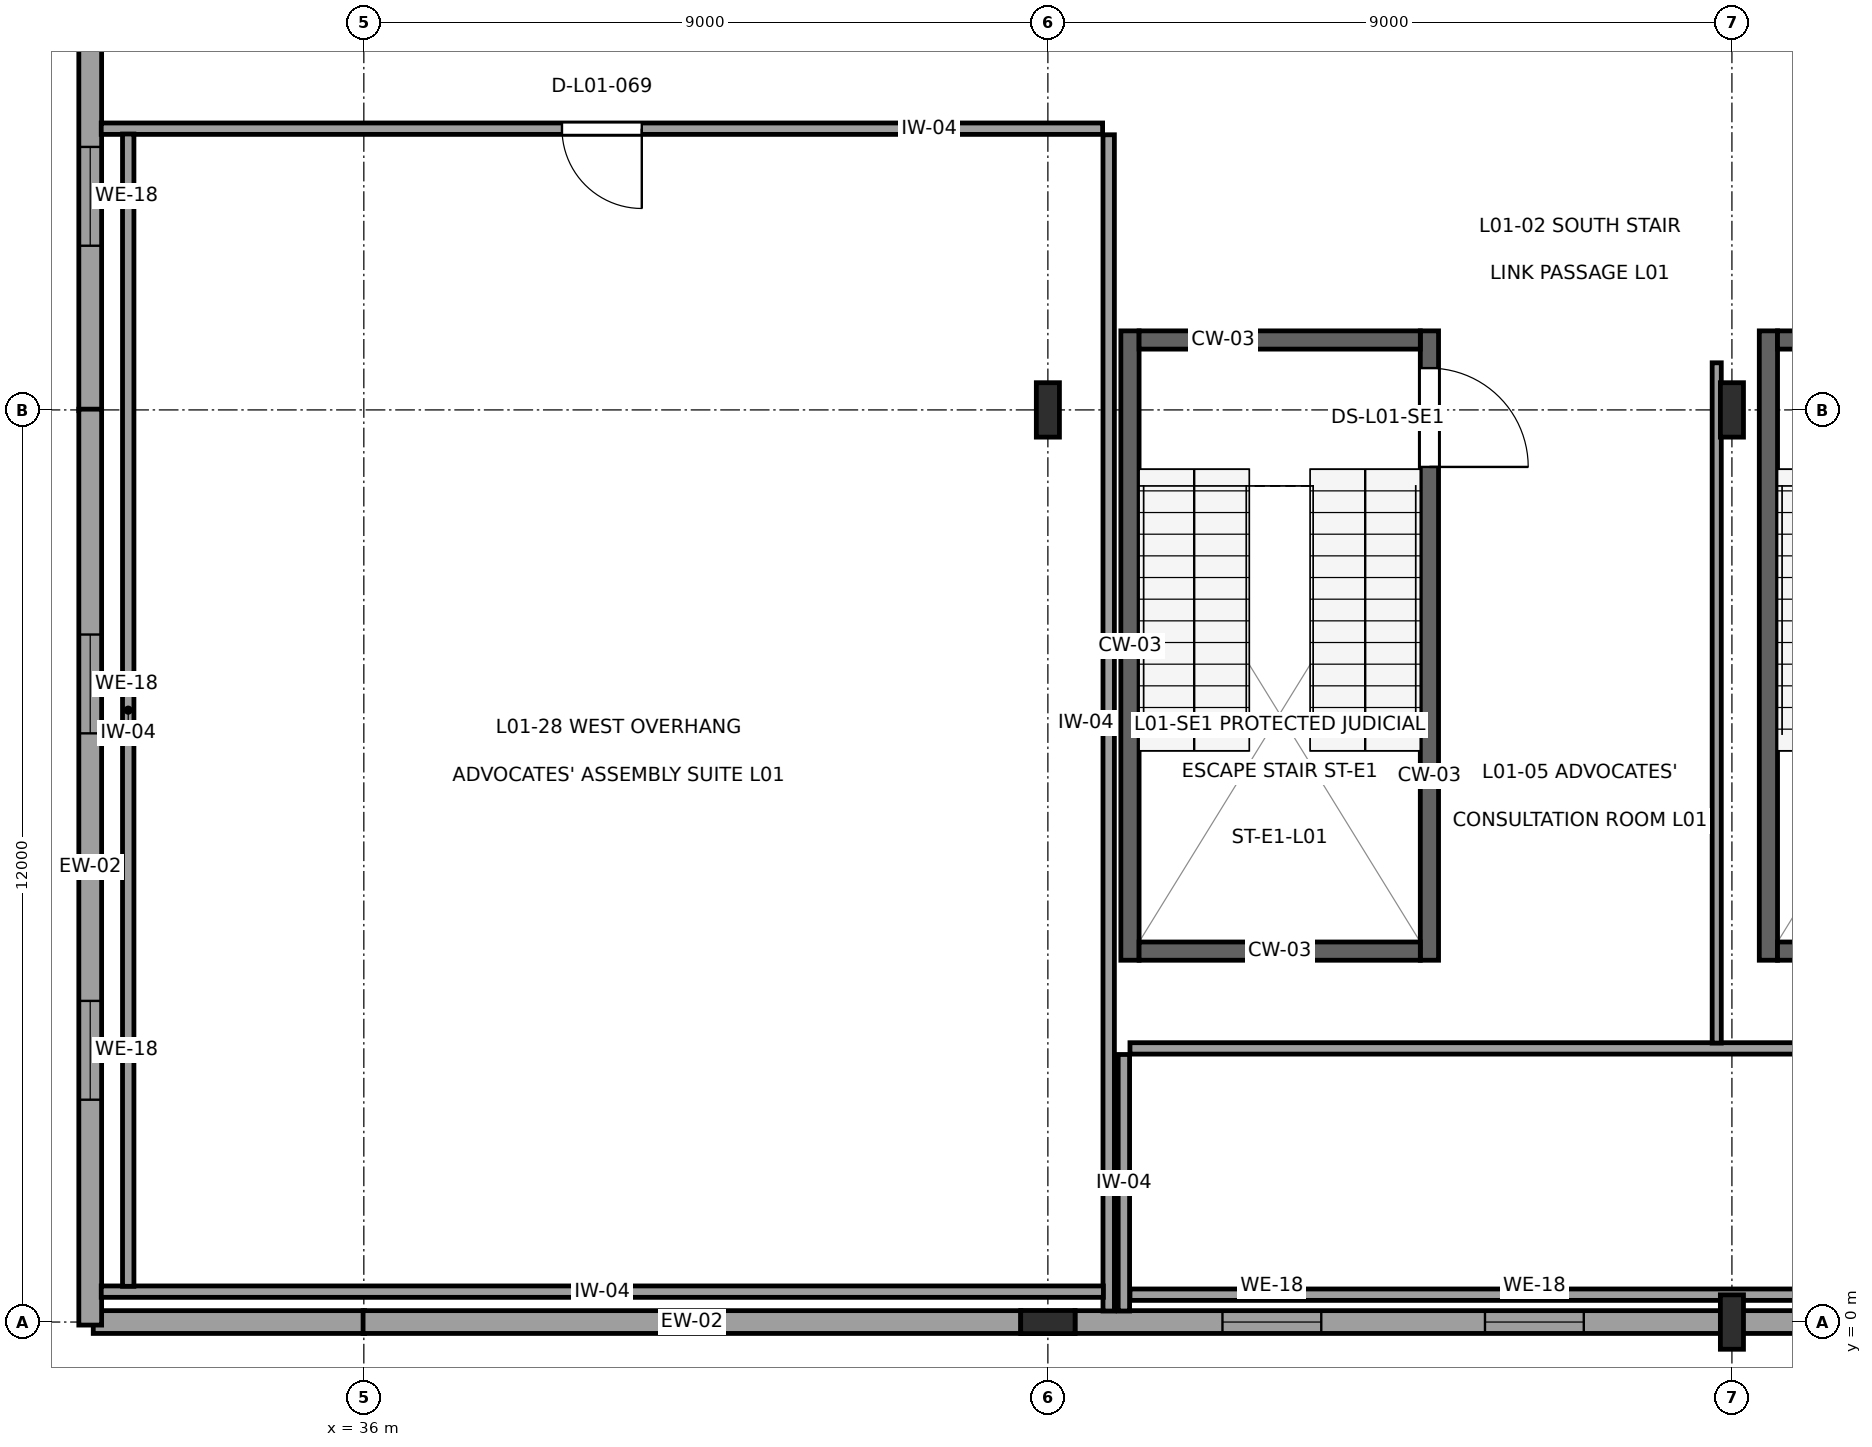
"""IFC4 building model, lengths in metres.
Left out: names, types, materials, properties, quantities, classifications, styles, units other than length and angle.
Written with IfcOpenShell. Run it as: python <this file> out.ifc"""

import sys

from ifc_helpers import new_model, si_unit, direction, frame, frame_2d, origin, origin_2d, place, context, subcontext, project, spatial, rectangle, i_section, extrude, element, fill, save


model = new_model("IFC4")
c1 = context("Model", 3, precision=1e-05, world=origin(), true_north=direction((0.0, 1.0)))
c2 = subcontext(c1, "Body", "Model", "MODEL_VIEW")
j1 = project(units=[si_unit("LENGTHUNIT", "METRE"), si_unit("PLANEANGLEUNIT", "RADIAN")], contexts=[c1])
p1 = place(None, origin())
s1 = spatial("IfcSite", under=j1, at=p1, CompositionType="ELEMENT")
p2 = place(p1, origin())
s2 = spatial("IfcBuilding", under=s1, at=p2, CompositionType="ELEMENT")
p3 = place(p2, frame((0.0, 0.0, 5.4)))
s3 = spatial("IfcBuildingStorey", under=s2, at=p3, CompositionType="ELEMENT", Elevation=5.4)
for number, where, z_axis, x_axis in (
    (1, (45.0, 0.0, 0.0), (0.0, 0.0, 1.0), (0.0, 1.0, 0.0)),
    (2, (45.0, 12.0, 0.0), (0.0, 0.0, 1.0), (1.0, 0.0, 0.0)),
    (3, (54.0, 0.0, 0.0), (0.0, 0.0, 1.0), (1.0, 0.0, 0.0)),
    (4, (54.0, 12.0, 0.0), (0.0, 0.0, 1.0), (1.0, 0.0, 0.0)),
):
    element("IfcColumn", number, at=place(p3, frame(where, z_axis=z_axis, x_axis=x_axis)), inside=s3, PredefinedType="COLUMN", context=c2, shape_type="SweptSolid", body=[
        extrude(i_section(OverallWidth=0.304, OverallDepth=0.716, WebThickness=0.021, FlangeThickness=0.04, at=origin_2d()), origin(), (0.0, 0.0, 1.0), 4.5),
    ])
p4 = place(p3, frame((32.44, 0.0, 0.0), z_axis=(0.0, 0.0, 1.0), x_axis=(1.0, 0.0, 0.0)))
e5 = element("IfcWall", 5, at=p4, inside=s3, PredefinedType="SOLIDWALL", context=c2, shape_type="SweptSolid", body=[
    extrude(rectangle(XDim=3.57, YDim=0.3, at=frame_2d((1.785, 0.0))), origin(), (0.0, 0.0, 1.0), 3.147),
])
p5 = place(p3, frame((35.99, 0.0, 0.0), z_axis=(0.0, 0.0, 1.0), x_axis=(1.0, 0.0, 0.0)))
e6 = element("IfcWall", 6, at=p5, inside=s3, PredefinedType="SOLIDWALL", context=c2, shape_type="SweptSolid", body=[
    extrude(rectangle(XDim=8.654, YDim=0.3, at=frame_2d((4.327, 0.0))), origin(), (0.0, 0.0, 1.0), 3.147),
])
p6 = place(p3, frame((45.356, 0.0, 0.0), z_axis=(0.0, 0.0, 1.0), x_axis=(1.0, 0.0, 0.0)))
e7 = element("IfcWall", 7, at=p6, inside=s3, PredefinedType="SOLIDWALL", context=c2, shape_type="SweptSolid", body=[
    extrude(rectangle(XDim=8.636, YDim=0.3, at=frame_2d((4.318, 0.0))), origin(), (0.0, 0.0, 1.0), 3.147),
])
p7 = place(p6, frame((1.941, 0.0, 0.9)))
e8 = element("IfcOpeningElement", 8, at=p7, cuts=e7, PredefinedType="OPENING", context=c2, shape_type="SweptSolid", body=[
    extrude(rectangle(XDim=1.3, YDim=1.3, at=frame_2d((0.65, 0.65))), frame((0.0, 0.165, 0.0), z_axis=(0.0, -1.0, 0.0), x_axis=(1.0, 0.0, 0.0)), (0.0, 0.0, 1.0), 0.33),
])
p8 = place(p6, frame((5.395, 0.0, 0.9)))
e9 = element("IfcOpeningElement", 9, at=p8, cuts=e7, PredefinedType="OPENING", context=c2, shape_type="SweptSolid", body=[
    extrude(rectangle(XDim=1.3, YDim=1.3, at=frame_2d((0.65, 0.65))), frame((0.0, 0.165, 0.0), z_axis=(0.0, -1.0, 0.0), x_axis=(1.0, 0.0, 0.0)), (0.0, 0.0, 1.0), 0.33),
])
p9 = place(p3, frame((54.008, 0.0, 0.0), z_axis=(0.0, 0.0, 1.0), x_axis=(1.0, 0.0, 0.0)))
e10 = element("IfcWall", 10, at=p9, inside=s3, PredefinedType="SOLIDWALL", context=c2, shape_type="SweptSolid", body=[
    extrude(rectangle(XDim=8.984, YDim=0.3, at=frame_2d((4.492, 0.0))), origin(), (0.0, 0.0, 1.0), 3.147),
])
p10 = place(p9, frame((2.045, 0.0, 0.9)))
e11 = element("IfcOpeningElement", 11, at=p10, cuts=e10, PredefinedType="OPENING", context=c2, shape_type="SweptSolid", body=[
    extrude(rectangle(XDim=1.3, YDim=1.3, at=frame_2d((0.65, 0.65))), frame((0.0, 0.165, 0.0), z_axis=(0.0, -1.0, 0.0), x_axis=(1.0, 0.0, 0.0)), (0.0, 0.0, 1.0), 0.33),
])
p11 = place(p9, frame((5.639, 0.0, 0.9)))
e12 = element("IfcOpeningElement", 12, at=p11, cuts=e10, PredefinedType="OPENING", context=c2, shape_type="SweptSolid", body=[
    extrude(rectangle(XDim=1.3, YDim=1.3, at=frame_2d((0.65, 0.65))), frame((0.0, 0.165, 0.0), z_axis=(0.0, -1.0, 0.0), x_axis=(1.0, 0.0, 0.0)), (0.0, 0.0, 1.0), 0.33),
])
p12 = place(p3, frame((32.4, 23.96, 0.0), z_axis=(0.0, 0.0, 1.0), x_axis=(0.0, -1.0, 0.0)))
e13 = element("IfcWall", 13, at=p12, inside=s3, PredefinedType="SOLIDWALL", context=c2, shape_type="SweptSolid", body=[
    extrude(rectangle(XDim=11.97, YDim=0.3, at=frame_2d((5.985, 0.0))), origin(), (0.0, 0.0, 1.0), 3.455),
])
p13 = place(p12, frame((2.941, 0.0, 0.9)))
e14 = element("IfcOpeningElement", 14, at=p13, cuts=e13, PredefinedType="OPENING", context=c2, shape_type="SweptSolid", body=[
    extrude(rectangle(XDim=1.3, YDim=1.3, at=frame_2d((0.65, 0.65))), frame((0.0, 0.165, 0.0), z_axis=(0.0, -1.0, 0.0), x_axis=(1.0, 0.0, 0.0)), (0.0, 0.0, 1.0), 0.33),
])
p14 = place(p12, frame((8.5, 0.0, 0.9)))
e15 = element("IfcOpeningElement", 15, at=p14, cuts=e13, PredefinedType="OPENING", context=c2, shape_type="SweptSolid", body=[
    extrude(rectangle(XDim=1.3, YDim=1.3, at=frame_2d((0.65, 0.65))), frame((0.0, 0.165, 0.0), z_axis=(0.0, -1.0, 0.0), x_axis=(1.0, 0.0, 0.0)), (0.0, 0.0, 1.0), 0.33),
])
p15 = place(p3, frame((32.4, 12.01, 0.0), z_axis=(0.0, 0.0, 1.0), x_axis=(0.0, -1.0, 0.0)))
e16 = element("IfcWall", 16, at=p15, inside=s3, PredefinedType="SOLIDWALL", context=c2, shape_type="SweptSolid", body=[
    extrude(rectangle(XDim=12.05, YDim=0.3, at=frame_2d((6.025, 0.0))), origin(), (0.0, 0.0, 1.0), 3.455),
])
p16 = place(p15, frame((2.965, 0.0, 0.9)))
e17 = element("IfcOpeningElement", 17, at=p16, cuts=e16, PredefinedType="OPENING", context=c2, shape_type="SweptSolid", body=[
    extrude(rectangle(XDim=1.3, YDim=1.3, at=frame_2d((0.65, 0.65))), frame((0.0, 0.165, 0.0), z_axis=(0.0, -1.0, 0.0), x_axis=(1.0, 0.0, 0.0)), (0.0, 0.0, 1.0), 0.33),
])
p17 = place(p15, frame((7.785, 0.0, 0.9)))
e18 = element("IfcOpeningElement", 18, at=p17, cuts=e16, PredefinedType="OPENING", context=c2, shape_type="SweptSolid", body=[
    extrude(rectangle(XDim=1.3, YDim=1.3, at=frame_2d((0.65, 0.65))), frame((0.0, 0.165, 0.0), z_axis=(0.0, -1.0, 0.0), x_axis=(1.0, 0.0, 0.0)), (0.0, 0.0, 1.0), 0.33),
])
p18 = place(p3, frame((54.48, 4.76, 0.0), z_axis=(0.0, 0.0, 1.0), x_axis=(0.0, 1.0, 0.0)))
e19 = element("IfcWall", 19, at=p18, inside=s3, PredefinedType="SHEAR", context=c2, shape_type="SweptSolid", body=[
    extrude(rectangle(XDim=8.28, YDim=0.24, at=frame_2d((4.14, 0.0))), origin(), (0.0, 0.0, 1.0), 4.31),
])
for number, where, z_axis, x_axis in (
    (20, (54.6, 4.88, 0.0), (0.0, 0.0, 1.0), (1.0, 0.0, 0.0)),
    (21, (54.6, 12.92, 0.0), (0.0, 0.0, 1.0), (1.0, 0.0, 0.0)),
):
    element("IfcWall", number, at=place(p3, frame(where, z_axis=z_axis, x_axis=x_axis)), inside=s3, PredefinedType="SHEAR", context=c2, shape_type="SweptSolid", body=[
        extrude(rectangle(XDim=3.7, YDim=0.24, at=frame_2d((1.85, 0.0))), origin(), (0.0, 0.0, 1.0), 4.31),
    ])
p19 = place(p3, frame((46.08, 4.76, 0.0), z_axis=(0.0, 0.0, 1.0), x_axis=(0.0, 1.0, 0.0)))
e22 = element("IfcWall", 22, at=p19, inside=s3, PredefinedType="SHEAR", context=c2, shape_type="SweptSolid", body=[
    extrude(rectangle(XDim=8.28, YDim=0.24, at=frame_2d((4.14, 0.0))), origin(), (0.0, 0.0, 1.0), 4.31),
])
p20 = place(p3, frame((50.02, 4.76, 0.0), z_axis=(0.0, 0.0, 1.0), x_axis=(0.0, 1.0, 0.0)))
e23 = element("IfcWall", 23, at=p20, inside=s3, PredefinedType="SHEAR", context=c2, shape_type="SweptSolid", body=[
    extrude(rectangle(XDim=8.28, YDim=0.24, at=frame_2d((4.14, 0.0))), origin(), (0.0, 0.0, 1.0), 4.31),
])
p21 = place(p20, frame((6.49, 0.0, 0.0)))
e24 = element("IfcOpeningElement", 24, at=p21, cuts=e23, PredefinedType="OPENING", context=c2, shape_type="SweptSolid", body=[
    extrude(rectangle(XDim=1.3, YDim=2.2, at=frame_2d((0.65, 1.1))), frame((0.0, 0.135, 0.0), z_axis=(0.0, -1.0, 0.0), x_axis=(1.0, 0.0, 0.0)), (0.0, 0.0, 1.0), 0.27),
])
for number, where, z_axis, x_axis in (
    (25, (46.2, 4.88, 0.0), (0.0, 0.0, 1.0), (1.0, 0.0, 0.0)),
    (26, (46.2, 12.92, 0.0), (0.0, 0.0, 1.0), (1.0, 0.0, 0.0)),
):
    element("IfcWall", number, at=place(p3, frame(where, z_axis=z_axis, x_axis=x_axis)), inside=s3, PredefinedType="SHEAR", context=c2, shape_type="SweptSolid", body=[
        extrude(rectangle(XDim=3.7, YDim=0.24, at=frame_2d((1.85, 0.0))), origin(), (0.0, 0.0, 1.0), 4.31),
    ])
p22 = place(p3, frame((71.92, 0.36, 0.0), z_axis=(0.0, 0.0, 1.0), x_axis=(-1.0, 0.0, 0.0)))
e27 = element("IfcWall", 27, at=p22, inside=s3, PredefinedType="PARTITIONING", context=c2, shape_type="SweptSolid", body=[
    extrude(rectangle(XDim=25.84, YDim=0.15, at=frame_2d((12.92, 0.0))), origin(), (0.0, 0.0, 1.0), 4.14),
])
p23 = place(p3, frame((46.0, 0.145, 0.0), z_axis=(0.0, 0.0, 1.0), x_axis=(0.0, 1.0, 0.0)))
e28 = element("IfcWall", 28, at=p23, inside=s3, PredefinedType="PARTITIONING", context=c2, shape_type="SweptSolid", body=[
    extrude(rectangle(XDim=3.375, YDim=0.15, at=frame_2d((1.688, 0.0))), origin(), (0.0, 0.0, 1.0), 4.14),
])
p24 = place(p3, frame((46.08, 3.6, 0.0), z_axis=(0.0, 0.0, 1.0), x_axis=(1.0, 0.0, 0.0)))
e29 = element("IfcWall", 29, at=p24, inside=s3, PredefinedType="PARTITIONING", context=c2, shape_type="SweptSolid", body=[
    extrude(rectangle(XDim=71.04, YDim=0.15, at=frame_2d((35.52, 0.0))), origin(), (0.0, 0.0, 1.0), 4.14),
])
p25 = place(p24, frame((31.995, 0.0, 0.0)))
e30 = element("IfcOpeningElement", 30, at=p25, cuts=e29, PredefinedType="OPENING", context=c2, shape_type="SweptSolid", body=[
    extrude(rectangle(XDim=1.05, YDim=2.25, at=frame_2d((0.525, 1.125))), frame((0.0, 0.09, 0.0), z_axis=(0.0, -1.0, 0.0), x_axis=(1.0, 0.0, 0.0)), (0.0, 0.0, 1.0), 0.18),
])
p26 = place(p24, frame((68.39, 0.0, 1.05)))
e31 = element("IfcOpeningElement", 31, at=p26, cuts=e29, PredefinedType="OPENING", context=c2, shape_type="SweptSolid", body=[
    extrude(rectangle(XDim=1.8, YDim=1.1, at=frame_2d((0.9, 0.55))), frame((0.0, 0.09, 0.0), z_axis=(0.0, -1.0, 0.0), x_axis=(1.0, 0.0, 0.0)), (0.0, 0.0, 1.0), 0.18),
])
p27 = place(p3, frame((53.8, 12.62, 0.0), z_axis=(0.0, 0.0, 1.0), x_axis=(0.0, -1.0, 0.0)))
e32 = element("IfcWall", 32, at=p27, inside=s3, PredefinedType="PARTITIONING", context=c2, shape_type="SweptSolid", body=[
    extrude(rectangle(XDim=8.95, YDim=0.12, at=frame_2d((4.475, 0.0))), origin(), (0.0, 0.0, 1.0), 3.735),
])
p28 = place(p3, frame((32.545, 15.7, 0.0), z_axis=(0.0, 0.0, 1.0), x_axis=(1.0, 0.0, 0.0)))
e33 = element("IfcWall", 33, at=p28, inside=s3, PredefinedType="PARTITIONING", context=c2, shape_type="SweptSolid", body=[
    extrude(rectangle(XDim=13.175, YDim=0.15, at=frame_2d((6.587, 0.0))), origin(), (0.0, 0.0, 1.0), 4.14),
])
p29 = place(p28, frame((6.062, 0.0, 0.0)))
e34 = element("IfcOpeningElement", 34, at=p29, cuts=e33, PredefinedType="OPENING", context=c2, shape_type="SweptSolid", body=[
    extrude(rectangle(XDim=1.05, YDim=2.25, at=frame_2d((0.525, 1.125))), frame((0.0, 0.09, 0.0), z_axis=(0.0, -1.0, 0.0), x_axis=(1.0, 0.0, 0.0)), (0.0, 0.0, 1.0), 0.18),
])
p30 = place(p3, frame((45.8, 15.62, 0.0), z_axis=(0.0, 0.0, 1.0), x_axis=(0.0, -1.0, 0.0)))
e35 = element("IfcWall", 35, at=p30, inside=s3, PredefinedType="PARTITIONING", context=c2, shape_type="SweptSolid", body=[
    extrude(rectangle(XDim=15.475, YDim=0.15, at=frame_2d((7.738, 0.0))), origin(), (0.0, 0.0, 1.0), 4.14),
])
p31 = place(p3, frame((45.73, 0.4, 0.0), z_axis=(0.0, 0.0, 1.0), x_axis=(-1.0, 0.0, 0.0)))
e36 = element("IfcWall", 36, at=p31, inside=s3, PredefinedType="PARTITIONING", context=c2, shape_type="SweptSolid", body=[
    extrude(rectangle(XDim=13.185, YDim=0.15, at=frame_2d((6.593, 0.0))), origin(), (0.0, 0.0, 1.0), 4.14),
])
p32 = place(p3, frame((32.9, 0.47, 0.0), z_axis=(0.0, 0.0, 1.0), x_axis=(0.0, 1.0, 0.0)))
e37 = element("IfcWall", 37, at=p32, inside=s3, PredefinedType="PARTITIONING", context=c2, shape_type="SweptSolid", body=[
    extrude(rectangle(XDim=15.16, YDim=0.15, at=frame_2d((7.58, 0.0))), origin(), (0.0, 0.0, 1.0), 4.14),
])
p33 = place(p7, origin())
e38 = element("IfcWindow", 38, at=p33, inside=s3, PartitioningType="SINGLE_PANEL", PredefinedType="WINDOW", context=c2, shape_type="SweptSolid", body=[
    extrude(rectangle(XDim=1.3, YDim=1.3, at=frame_2d((0.65, 0.65))), frame((0.0, 0.03, 0.0), z_axis=(0.0, -1.0, 0.0), x_axis=(1.0, 0.0, 0.0)), (0.0, 0.0, 1.0), 0.06),
])
fill(e8, e38)
p34 = place(p8, origin())
e39 = element("IfcWindow", 39, at=p34, inside=s3, PartitioningType="SINGLE_PANEL", PredefinedType="WINDOW", context=c2, shape_type="SweptSolid", body=[
    extrude(rectangle(XDim=1.3, YDim=1.3, at=frame_2d((0.65, 0.65))), frame((0.0, 0.03, 0.0), z_axis=(0.0, -1.0, 0.0), x_axis=(1.0, 0.0, 0.0)), (0.0, 0.0, 1.0), 0.06),
])
fill(e9, e39)
p35 = place(p14, origin())
e40 = element("IfcWindow", 40, at=p35, inside=s3, PartitioningType="SINGLE_PANEL", PredefinedType="WINDOW", context=c2, shape_type="SweptSolid", body=[
    extrude(rectangle(XDim=1.3, YDim=1.3, at=frame_2d((0.65, 0.65))), frame((0.0, 0.03, 0.0), z_axis=(0.0, -1.0, 0.0), x_axis=(1.0, 0.0, 0.0)), (0.0, 0.0, 1.0), 0.06),
])
fill(e15, e40)
p36 = place(p16, origin())
e41 = element("IfcWindow", 41, at=p36, inside=s3, PartitioningType="SINGLE_PANEL", PredefinedType="WINDOW", context=c2, shape_type="SweptSolid", body=[
    extrude(rectangle(XDim=1.3, YDim=1.3, at=frame_2d((0.65, 0.65))), frame((0.0, 0.03, 0.0), z_axis=(0.0, -1.0, 0.0), x_axis=(1.0, 0.0, 0.0)), (0.0, 0.0, 1.0), 0.06),
])
fill(e17, e41)
p37 = place(p17, origin())
e42 = element("IfcWindow", 42, at=p37, inside=s3, PartitioningType="SINGLE_PANEL", PredefinedType="WINDOW", context=c2, shape_type="SweptSolid", body=[
    extrude(rectangle(XDim=1.3, YDim=1.3, at=frame_2d((0.65, 0.65))), frame((0.0, 0.03, 0.0), z_axis=(0.0, -1.0, 0.0), x_axis=(1.0, 0.0, 0.0)), (0.0, 0.0, 1.0), 0.06),
])
fill(e18, e42)
p38 = place(p21, frame((1.3, 0.0, 0.0), z_axis=(0.0, 0.0, 1.0), x_axis=(-1.0, 0.0, 0.0)))
e43 = element("IfcDoor", 43, at=p38, inside=s3, OperationType="SINGLE_SWING_LEFT", PredefinedType="DOOR", context=c2, shape_type="SweptSolid", body=[
    extrude(rectangle(XDim=1.3, YDim=2.2, at=frame_2d((0.65, 1.1))), frame((0.0, 0.025, 0.0), z_axis=(0.0, -1.0, 0.0), x_axis=(1.0, 0.0, 0.0)), (0.0, 0.0, 1.0), 0.05),
])
fill(e24, e43)
p39 = place(p29, frame((1.05, 0.0, 0.0), z_axis=(0.0, 0.0, 1.0), x_axis=(-1.0, 0.0, 0.0)))
e44 = element("IfcDoor", 44, at=p39, inside=s3, OperationType="SINGLE_SWING_RIGHT", PredefinedType="DOOR", context=c2, shape_type="SweptSolid", body=[
    extrude(rectangle(XDim=1.05, YDim=2.25, at=frame_2d((0.525, 1.125))), frame((0.0, 0.025, 0.0), z_axis=(0.0, -1.0, 0.0), x_axis=(1.0, 0.0, 0.0)), (0.0, 0.0, 1.0), 0.05),
])
fill(e34, e44)
save(model, sys.argv[1])
